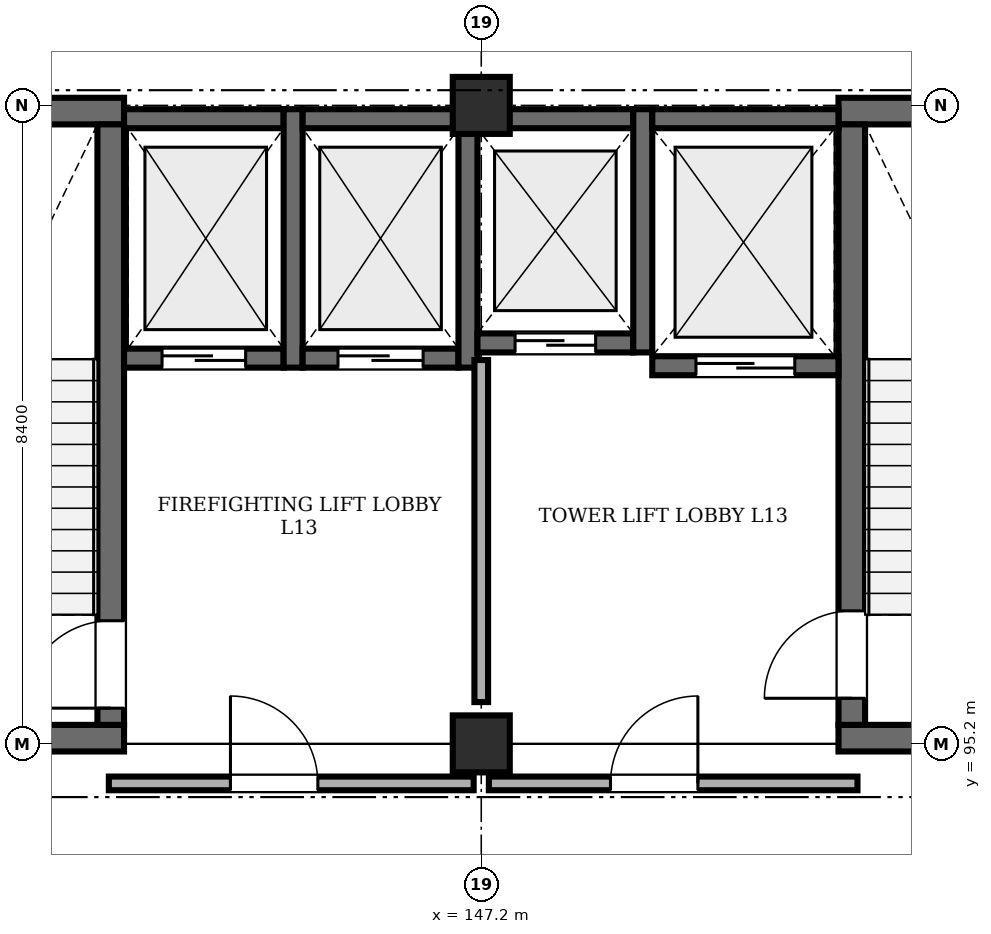
"""IFC4 building model, lengths in metres.
Left out: names, types, materials, properties, quantities, classifications, styles, units other than length and angle.
Written with IfcOpenShell. Run it as: python <this file> out.ifc"""

import sys

from ifc_helpers import new_model, si_unit, direction, frame, frame_2d, origin, origin_2d, place, context, subcontext, project, spatial, rectangle, extrude, element, fill, save


model = new_model("IFC4")
c1 = context("Model", 3, precision=1e-05, world=origin(), true_north=direction((0.0, 1.0)))
c2 = subcontext(c1, "Body", "Model", "MODEL_VIEW")
j1 = project(units=[si_unit("LENGTHUNIT", "METRE"), si_unit("PLANEANGLEUNIT", "RADIAN")], contexts=[c1])
p1 = place(None, origin())
s1 = spatial("IfcSite", under=j1, at=p1, CompositionType="ELEMENT")
p2 = place(p1, origin())
s2 = spatial("IfcBuilding", under=s1, at=p2, CompositionType="ELEMENT")
p3 = place(p2, frame((0.0, 0.0, 52.8)))
s3 = spatial("IfcBuildingStorey", under=s2, at=p3, CompositionType="ELEMENT", Elevation=52.8)
for number, where, z_axis, x_axis in (
    (1, (147.2, 95.2, 0.0), (0.0, 0.0, 1.0), (1.0, 0.0, 0.0)),
    (2, (147.2, 103.6, 0.0), (0.0, 0.0, 1.0), (1.0, 0.0, 0.0)),
):
    element("IfcColumn", number, at=place(p3, frame(where, z_axis=z_axis, x_axis=x_axis)), inside=s3, PredefinedType="COLUMN", context=c2, shape_type="SweptSolid", body=[
        extrude(rectangle(XDim=0.75, YDim=0.75, at=origin_2d()), origin(), (0.0, 0.0, 1.0), 4.03),
    ])
for number, where, z_axis, x_axis in (
    (3, (138.7, 95.275, 0.0), (0.0, 0.0, 1.0), (1.0, 0.0, 0.0)),
    (4, (138.7, 103.525, 0.0), (0.0, 0.0, 1.0), (1.0, 0.0, 0.0)),
):
    element("IfcWall", number, at=place(p3, frame(where, z_axis=z_axis, x_axis=x_axis)), inside=s3, PredefinedType="SHEAR", context=c2, shape_type="SweptSolid", body=[
        extrude(rectangle(XDim=3.8, YDim=0.35, at=frame_2d((1.9, 0.0))), origin(), (0.0, 0.0, 1.0), 4.03),
    ])
p4 = place(p3, frame((142.325, 95.45, 0.0), z_axis=(0.0, 0.0, 1.0), x_axis=(0.0, 1.0, 0.0)))
e5 = element("IfcWall", 5, at=p4, inside=s3, PredefinedType="SHEAR", context=c2, shape_type="SweptSolid", body=[
    extrude(rectangle(XDim=7.9, YDim=0.35, at=frame_2d((3.95, 0.0))), origin(), (0.0, 0.0, 1.0), 4.03),
])
p5 = place(p4, frame((0.22, 0.0, 0.0)))
e6 = element("IfcOpeningElement", 6, at=p5, cuts=e5, PredefinedType="OPENING", context=c2, shape_type="SweptSolid", body=[
    extrude(rectangle(XDim=1.15, YDim=2.15, at=frame_2d((0.575, 1.075))), frame((0.0, 0.185, 0.0), z_axis=(0.0, -1.0, 0.0), x_axis=(1.0, 0.0, 0.0)), (0.0, 0.0, 1.0), 0.37),
])
for number, where, z_axis, x_axis in (
    (7, (151.9, 95.275, 0.0), (0.0, 0.0, 1.0), (1.0, 0.0, 0.0)),
    (8, (151.9, 103.525, 0.0), (0.0, 0.0, 1.0), (1.0, 0.0, 0.0)),
):
    element("IfcWall", number, at=place(p3, frame(where, z_axis=z_axis, x_axis=x_axis)), inside=s3, PredefinedType="SHEAR", context=c2, shape_type="SweptSolid", body=[
        extrude(rectangle(XDim=3.8, YDim=0.35, at=frame_2d((1.9, 0.0))), origin(), (0.0, 0.0, 1.0), 4.03),
    ])
p6 = place(p3, frame((152.075, 95.45, 0.0), z_axis=(0.0, 0.0, 1.0), x_axis=(0.0, 1.0, 0.0)))
e9 = element("IfcWall", 9, at=p6, inside=s3, PredefinedType="SHEAR", context=c2, shape_type="SweptSolid", body=[
    extrude(rectangle(XDim=7.9, YDim=0.35, at=frame_2d((3.95, 0.0))), origin(), (0.0, 0.0, 1.0), 4.03),
])
p7 = place(p6, frame((0.35, 0.0, 0.0)))
e10 = element("IfcOpeningElement", 10, at=p7, cuts=e9, PredefinedType="OPENING", context=c2, shape_type="SweptSolid", body=[
    extrude(rectangle(XDim=1.15, YDim=2.15, at=frame_2d((0.575, 1.075))), frame((0.0, 0.185, 0.0), z_axis=(0.0, -1.0, 0.0), x_axis=(1.0, 0.0, 0.0)), (0.0, 0.0, 1.0), 0.37),
])
p8 = place(p3, frame((142.5, 100.275, 0.0), z_axis=(0.0, 0.0, 1.0), x_axis=(1.0, 0.0, 0.0)))
e11 = element("IfcWall", 11, at=p8, inside=s3, PredefinedType="SHEAR", context=c2, shape_type="SweptSolid", body=[
    extrude(rectangle(XDim=2.1, YDim=0.25, at=frame_2d((1.05, 0.0))), origin(), (0.0, 0.0, 1.0), 4.03),
])
p9 = place(p8, frame((0.5, 0.0, 0.0)))
e12 = element("IfcOpeningElement", 12, at=p9, cuts=e11, PredefinedType="OPENING", context=c2, shape_type="SweptSolid", body=[
    extrude(rectangle(XDim=1.1, YDim=2.15, at=frame_2d((0.55, 1.075))), frame((0.0, 0.135, 0.0), z_axis=(0.0, -1.0, 0.0), x_axis=(1.0, 0.0, 0.0)), (0.0, 0.0, 1.0), 0.27),
])
p10 = place(p3, frame((142.5, 103.425, 0.0), z_axis=(0.0, 0.0, 1.0), x_axis=(1.0, 0.0, 0.0)))
e13 = element("IfcWall", 13, at=p10, inside=s3, PredefinedType="SHEAR", context=c2, shape_type="SweptSolid", body=[
    extrude(rectangle(XDim=2.1, YDim=0.25, at=frame_2d((1.05, 0.0))), origin(), (0.0, 0.0, 1.0), 4.03),
])
p11 = place(p3, frame((144.725, 100.15, 0.0), z_axis=(0.0, 0.0, 1.0), x_axis=(0.0, 1.0, 0.0)))
e14 = element("IfcWall", 14, at=p11, inside=s3, PredefinedType="SHEAR", context=c2, shape_type="SweptSolid", body=[
    extrude(rectangle(XDim=3.4, YDim=0.25, at=frame_2d((1.7, 0.0))), origin(), (0.0, 0.0, 1.0), 4.03),
])
p12 = place(p3, frame((144.85, 100.275, 0.0), z_axis=(0.0, 0.0, 1.0), x_axis=(1.0, 0.0, 0.0)))
e15 = element("IfcWall", 15, at=p12, inside=s3, PredefinedType="SHEAR", context=c2, shape_type="SweptSolid", body=[
    extrude(rectangle(XDim=2.05, YDim=0.25, at=frame_2d((1.025, 0.0))), origin(), (0.0, 0.0, 1.0), 4.03),
])
p13 = place(p12, frame((0.465, 0.0, 0.0)))
e16 = element("IfcOpeningElement", 16, at=p13, cuts=e15, PredefinedType="OPENING", context=c2, shape_type="SweptSolid", body=[
    extrude(rectangle(XDim=1.12, YDim=2.15, at=frame_2d((0.56, 1.075))), frame((0.0, 0.135, 0.0), z_axis=(0.0, -1.0, 0.0), x_axis=(1.0, 0.0, 0.0)), (0.0, 0.0, 1.0), 0.27),
])
p14 = place(p3, frame((144.85, 103.425, 0.0), z_axis=(0.0, 0.0, 1.0), x_axis=(1.0, 0.0, 0.0)))
e17 = element("IfcWall", 17, at=p14, inside=s3, PredefinedType="SHEAR", context=c2, shape_type="SweptSolid", body=[
    extrude(rectangle(XDim=2.05, YDim=0.25, at=frame_2d((1.025, 0.0))), origin(), (0.0, 0.0, 1.0), 4.03),
])
p15 = place(p3, frame((147.025, 100.15, 0.0), z_axis=(0.0, 0.0, 1.0), x_axis=(0.0, 1.0, 0.0)))
e18 = element("IfcWall", 18, at=p15, inside=s3, PredefinedType="SHEAR", context=c2, shape_type="SweptSolid", body=[
    extrude(rectangle(XDim=3.4, YDim=0.25, at=frame_2d((1.7, 0.0))), origin(), (0.0, 0.0, 1.0), 4.03),
])
p16 = place(p3, frame((147.15, 100.475, 0.0), z_axis=(0.0, 0.0, 1.0), x_axis=(1.0, 0.0, 0.0)))
e19 = element("IfcWall", 19, at=p16, inside=s3, PredefinedType="SHEAR", context=c2, shape_type="SweptSolid", body=[
    extrude(rectangle(XDim=2.05, YDim=0.25, at=frame_2d((1.025, 0.0))), origin(), (0.0, 0.0, 1.0), 4.03),
])
p17 = place(p16, frame((0.495, 0.0, 0.0)))
e20 = element("IfcOpeningElement", 20, at=p17, cuts=e19, PredefinedType="OPENING", context=c2, shape_type="SweptSolid", body=[
    extrude(rectangle(XDim=1.06, YDim=2.15, at=frame_2d((0.53, 1.075))), frame((0.0, 0.135, 0.0), z_axis=(0.0, -1.0, 0.0), x_axis=(1.0, 0.0, 0.0)), (0.0, 0.0, 1.0), 0.27),
])
p18 = place(p3, frame((147.15, 103.425, 0.0), z_axis=(0.0, 0.0, 1.0), x_axis=(1.0, 0.0, 0.0)))
e21 = element("IfcWall", 21, at=p18, inside=s3, PredefinedType="SHEAR", context=c2, shape_type="SweptSolid", body=[
    extrude(rectangle(XDim=2.05, YDim=0.25, at=frame_2d((1.025, 0.0))), origin(), (0.0, 0.0, 1.0), 4.03),
])
p19 = place(p3, frame((149.325, 100.35, 0.0), z_axis=(0.0, 0.0, 1.0), x_axis=(0.0, 1.0, 0.0)))
e22 = element("IfcWall", 22, at=p19, inside=s3, PredefinedType="SHEAR", context=c2, shape_type="SweptSolid", body=[
    extrude(rectangle(XDim=3.2, YDim=0.25, at=frame_2d((1.6, 0.0))), origin(), (0.0, 0.0, 1.0), 4.03),
])
p20 = place(p3, frame((149.45, 100.175, 0.0), z_axis=(0.0, 0.0, 1.0), x_axis=(1.0, 0.0, 0.0)))
e23 = element("IfcWall", 23, at=p20, inside=s3, PredefinedType="SHEAR", context=c2, shape_type="SweptSolid", body=[
    extrude(rectangle(XDim=2.45, YDim=0.25, at=frame_2d((1.225, 0.0))), origin(), (0.0, 0.0, 1.0), 4.03),
])
p21 = place(p20, frame((0.575, 0.0, 0.0)))
e24 = element("IfcOpeningElement", 24, at=p21, cuts=e23, PredefinedType="OPENING", context=c2, shape_type="SweptSolid", body=[
    extrude(rectangle(XDim=1.3, YDim=2.25, at=frame_2d((0.65, 1.125))), frame((0.0, 0.135, 0.0), z_axis=(0.0, -1.0, 0.0), x_axis=(1.0, 0.0, 0.0)), (0.0, 0.0, 1.0), 0.27),
])
p22 = place(p3, frame((149.45, 103.425, 0.0), z_axis=(0.0, 0.0, 1.0), x_axis=(1.0, 0.0, 0.0)))
e25 = element("IfcWall", 25, at=p22, inside=s3, PredefinedType="SHEAR", context=c2, shape_type="SweptSolid", body=[
    extrude(rectangle(XDim=2.45, YDim=0.25, at=frame_2d((1.225, 0.0))), origin(), (0.0, 0.0, 1.0), 4.03),
])
p23 = place(p3, frame((142.3, 94.68, 0.0), z_axis=(0.0, 0.0, 1.0), x_axis=(1.0, 0.0, 0.0)))
e26 = element("IfcWall", 26, at=p23, inside=s3, PredefinedType="STANDARD", context=c2, shape_type="SweptSolid", body=[
    extrude(rectangle(XDim=4.8, YDim=0.18, at=frame_2d((2.4, 0.0))), origin(), (0.0, 0.0, 1.0), 4.03),
])
p24 = place(p23, frame((1.6, 0.0, 0.0)))
e27 = element("IfcOpeningElement", 27, at=p24, cuts=e26, PredefinedType="OPENING", context=c2, shape_type="SweptSolid", body=[
    extrude(rectangle(XDim=1.15, YDim=2.15, at=frame_2d((0.575, 1.075))), frame((0.0, 0.1, 0.0), z_axis=(0.0, -1.0, 0.0), x_axis=(1.0, 0.0, 0.0)), (0.0, 0.0, 1.0), 0.2),
])
p25 = place(p3, frame((147.3, 94.68, 0.0), z_axis=(0.0, 0.0, 1.0), x_axis=(1.0, 0.0, 0.0)))
e28 = element("IfcWall", 28, at=p25, inside=s3, PredefinedType="STANDARD", context=c2, shape_type="SweptSolid", body=[
    extrude(rectangle(XDim=4.85, YDim=0.18, at=frame_2d((2.425, 0.0))), origin(), (0.0, 0.0, 1.0), 4.03),
])
p26 = place(p25, frame((1.6, 0.0, 0.0)))
e29 = element("IfcOpeningElement", 29, at=p26, cuts=e28, PredefinedType="OPENING", context=c2, shape_type="SweptSolid", body=[
    extrude(rectangle(XDim=1.15, YDim=2.15, at=frame_2d((0.575, 1.075))), frame((0.0, 0.1, 0.0), z_axis=(0.0, -1.0, 0.0), x_axis=(1.0, 0.0, 0.0)), (0.0, 0.0, 1.0), 0.2),
])
p27 = place(p3, frame((147.2, 95.75, 0.0), z_axis=(0.0, 0.0, 1.0), x_axis=(0.0, 1.0, 0.0)))
e30 = element("IfcWall", 30, at=p27, inside=s3, PredefinedType="STANDARD", context=c2, shape_type="SweptSolid", body=[
    extrude(rectangle(XDim=4.5, YDim=0.18, at=frame_2d((2.25, 0.0))), origin(), (0.0, 0.0, 1.0), 3.33),
])
p28 = place(p24, origin())
e31 = element("IfcDoor", 31, at=p28, inside=s3, OperationType="SINGLE_SWING_LEFT", PredefinedType="DOOR", context=c2, shape_type="SweptSolid", body=[
    extrude(rectangle(XDim=1.15, YDim=2.15, at=frame_2d((0.575, 1.075))), frame((0.0, 0.025, 0.0), z_axis=(0.0, -1.0, 0.0), x_axis=(1.0, 0.0, 0.0)), (0.0, 0.0, 1.0), 0.05),
])
fill(e27, e31)
p29 = place(p26, origin())
e32 = element("IfcDoor", 32, at=p29, inside=s3, OperationType="SINGLE_SWING_RIGHT", PredefinedType="DOOR", context=c2, shape_type="SweptSolid", body=[
    extrude(rectangle(XDim=1.15, YDim=2.15, at=frame_2d((0.575, 1.075))), frame((0.0, 0.025, 0.0), z_axis=(0.0, -1.0, 0.0), x_axis=(1.0, 0.0, 0.0)), (0.0, 0.0, 1.0), 0.05),
])
fill(e29, e32)
p30 = place(p5, origin())
e33 = element("IfcDoor", 33, at=p30, inside=s3, OperationType="SINGLE_SWING_LEFT", PredefinedType="DOOR", context=c2, shape_type="SweptSolid", body=[
    extrude(rectangle(XDim=1.15, YDim=2.15, at=frame_2d((0.575, 1.075))), frame((0.0, 0.025, 0.0), z_axis=(0.0, -1.0, 0.0), x_axis=(1.0, 0.0, 0.0)), (0.0, 0.0, 1.0), 0.05),
])
fill(e6, e33)
p31 = place(p7, origin())
e34 = element("IfcDoor", 34, at=p31, inside=s3, OperationType="SINGLE_SWING_LEFT", PredefinedType="DOOR", context=c2, shape_type="SweptSolid", body=[
    extrude(rectangle(XDim=1.15, YDim=2.15, at=frame_2d((0.575, 1.075))), frame((0.0, 0.025, 0.0), z_axis=(0.0, -1.0, 0.0), x_axis=(1.0, 0.0, 0.0)), (0.0, 0.0, 1.0), 0.05),
])
fill(e10, e34)
p32 = place(p9, origin())
e35 = element("IfcDoor", 35, at=p32, inside=s3, OperationType="SLIDING_TO_LEFT", PredefinedType="DOOR", context=c2, shape_type="SweptSolid", body=[
    extrude(rectangle(XDim=1.1, YDim=2.15, at=frame_2d((0.55, 1.075))), frame((0.0, 0.025, 0.0), z_axis=(0.0, -1.0, 0.0), x_axis=(1.0, 0.0, 0.0)), (0.0, 0.0, 1.0), 0.05),
])
fill(e12, e35)
p33 = place(p13, origin())
e36 = element("IfcDoor", 36, at=p33, inside=s3, OperationType="SLIDING_TO_LEFT", PredefinedType="DOOR", context=c2, shape_type="SweptSolid", body=[
    extrude(rectangle(XDim=1.12, YDim=2.15, at=frame_2d((0.56, 1.075))), frame((0.0, 0.025, 0.0), z_axis=(0.0, -1.0, 0.0), x_axis=(1.0, 0.0, 0.0)), (0.0, 0.0, 1.0), 0.05),
])
fill(e16, e36)
p34 = place(p17, origin())
e37 = element("IfcDoor", 37, at=p34, inside=s3, OperationType="SLIDING_TO_LEFT", PredefinedType="DOOR", context=c2, shape_type="SweptSolid", body=[
    extrude(rectangle(XDim=1.06, YDim=2.15, at=frame_2d((0.53, 1.075))), frame((0.0, 0.025, 0.0), z_axis=(0.0, -1.0, 0.0), x_axis=(1.0, 0.0, 0.0)), (0.0, 0.0, 1.0), 0.05),
])
fill(e20, e37)
p35 = place(p21, origin())
e38 = element("IfcDoor", 38, at=p35, inside=s3, OperationType="SLIDING_TO_LEFT", PredefinedType="DOOR", context=c2, shape_type="SweptSolid", body=[
    extrude(rectangle(XDim=1.3, YDim=2.25, at=frame_2d((0.65, 1.125))), frame((0.0, 0.025, 0.0), z_axis=(0.0, -1.0, 0.0), x_axis=(1.0, 0.0, 0.0)), (0.0, 0.0, 1.0), 0.05),
])
fill(e24, e38)
save(model, sys.argv[1])
